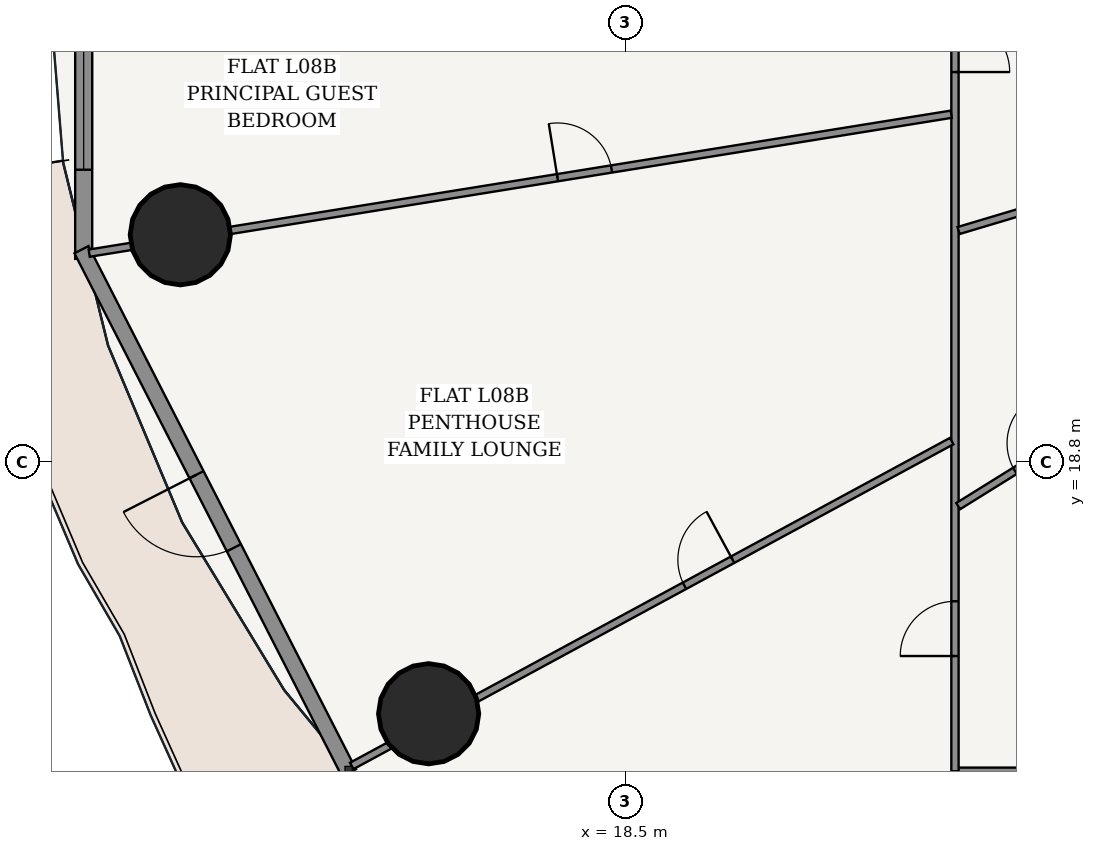
"""IFC4 building model, lengths in metres.
Left out: names, types, materials, properties, quantities, classifications, styles, units other than length and angle.
Written with IfcOpenShell. Run it as: python <this file> out.ifc"""

import sys

from ifc_helpers import new_model, si_unit, direction, frame, frame_2d, origin, origin_2d, place, context, subcontext, project, spatial, rectangle, hollow_circle, extrude, source, transform, mapped, element, fill, save


model = new_model("IFC4")
c1 = context("Model", 3, precision=1e-05, world=origin(), true_north=direction((-0.2419218956, 0.970295726276)))
c2 = subcontext(c1, "Body", "Model", "MODEL_VIEW")
j1 = project(units=[si_unit("LENGTHUNIT", "METRE"), si_unit("PLANEANGLEUNIT", "RADIAN")], contexts=[c1])
p1 = place(None, origin())
s1 = spatial("IfcSite", under=j1, at=p1, CompositionType="ELEMENT")
p2 = place(p1, origin())
s2 = spatial("IfcBuilding", under=s1, at=p2, CompositionType="ELEMENT")
p3 = place(p2, frame((0.0, 0.0, 34.8)))
s3 = spatial("IfcBuildingStorey", under=s2, at=p3, CompositionType="ELEMENT", Elevation=34.8)
for number, where, z_axis, x_axis in (
    (1, (11.176, 22.537, 0.0), (0.0, 0.0, 1.0), (1.0, 0.0, 0.0)),
    (2, (15.259, 14.661, 0.0), (0.0, 0.0, 1.0), (1.0, 0.0, 0.0)),
):
    element("IfcColumn", number, at=place(p3, frame(where, z_axis=z_axis, x_axis=x_axis)), inside=s3, PredefinedType="COLUMN", context=c2, shape_type="SweptSolid", body=[
        extrude(hollow_circle(Radius=0.825, WallThickness=0.05, at=origin_2d()), origin(), (0.0, 0.0, 1.0), 3.6),
    ])
p4 = place(p3, frame((9.587, 31.459, 0.0), z_axis=(0.0, 0.0, 1.0), x_axis=(0.0, -1.0, 0.0)))
e3 = element("IfcWall", 3, at=p4, inside=s3, PredefinedType="SOLIDWALL", context=c2, shape_type="SweptSolid", body=[
    extrude(rectangle(XDim=9.318, YDim=0.28, at=frame_2d((4.659, 0.0))), origin(), (0.0, 0.0, 1.0), 3.32),
])
p5 = place(p4, frame((1.466, 0.0, 0.85)))
e4 = element("IfcOpeningElement", 4, at=p5, cuts=e3, PredefinedType="OPENING", context=c2, shape_type="SweptSolid", body=[
    extrude(rectangle(XDim=2.1, YDim=1.95, at=frame_2d((1.05, 0.975))), frame((0.0, 0.15, 0.0), z_axis=(0.0, -1.0, 0.0), x_axis=(1.0, 0.0, 0.0)), (0.0, 0.0, 1.0), 0.3),
])
p6 = place(p4, frame((5.752, 0.0, 0.85)))
e5 = element("IfcOpeningElement", 5, at=p6, cuts=e3, PredefinedType="OPENING", context=c2, shape_type="SweptSolid", body=[
    extrude(rectangle(XDim=2.1, YDim=1.95, at=frame_2d((1.05, 0.975))), frame((0.0, 0.15, 0.0), z_axis=(0.0, -1.0, 0.0), x_axis=(1.0, 0.0, 0.0)), (0.0, 0.0, 1.0), 0.3),
])
p7 = place(p3, frame((9.55, 22.292, 0.0), z_axis=(0.0, 0.0, 1.0), x_axis=(0.455220575541, -0.890378698984, 0.0)))
e6 = element("IfcWall", 6, at=p7, inside=s3, PredefinedType="SOLIDWALL", context=c2, shape_type="SweptSolid", body=[
    extrude(rectangle(XDim=9.662, YDim=0.26, at=frame_2d((4.831, 0.0))), origin(), (0.0, 0.0, 1.0), 3.32),
])
p8 = place(p7, frame((4.156, 0.0, 0.0)))
e7 = element("IfcOpeningElement", 7, at=p8, cuts=e6, PredefinedType="OPENING", context=c2, shape_type="SweptSolid", body=[
    extrude(rectangle(XDim=1.35, YDim=2.2, at=frame_2d((0.675, 1.1))), frame((0.0, 0.14, 0.0), z_axis=(0.0, -1.0, 0.0), x_axis=(1.0, 0.0, 0.0)), (0.0, 0.0, 1.0), 0.28),
])
p9 = place(p3, frame((27.109, 13.715, 0.0), z_axis=(0.0, 0.0, 1.0), x_axis=(-1.0, 0.0, 0.0)))
e8 = element("IfcWall", 8, at=p9, inside=s3, PredefinedType="PARTITIONING", context=c2, shape_type="SweptSolid", body=[
    extrude(rectangle(XDim=3.194, YDim=0.12, at=frame_2d((1.597, 0.0))), origin(), (0.0, 0.0, 1.0), 2.688),
])
p10 = place(p3, frame((23.915, 13.715, 0.0), z_axis=(0.0, 0.0, 1.0), x_axis=(0.0, 1.0, 0.0)))
e9 = element("IfcWall", 9, at=p10, inside=s3, PredefinedType="PARTITIONING", context=c2, shape_type="SweptSolid", body=[
    extrude(rectangle(XDim=26.17, YDim=0.12, at=frame_2d((13.085, 0.0))), origin(), (0.0, 0.0, 1.0), 2.688),
])
p11 = place(p10, frame((1.895, 0.0, 0.0)))
e10 = element("IfcOpeningElement", 10, at=p11, cuts=e9, PredefinedType="OPENING", context=c2, shape_type="SweptSolid", body=[
    extrude(rectangle(XDim=0.9, YDim=2.15, at=frame_2d((0.45, 1.075))), frame((0.0, 0.07, 0.0), z_axis=(0.0, -1.0, 0.0), x_axis=(1.0, 0.0, 0.0)), (0.0, 0.0, 1.0), 0.14),
])
p12 = place(p10, frame((11.498, 0.0, 0.0)))
e11 = element("IfcOpeningElement", 11, at=p12, cuts=e9, PredefinedType="OPENING", context=c2, shape_type="SweptSolid", body=[
    extrude(rectangle(XDim=0.9, YDim=2.15, at=frame_2d((0.45, 1.075))), frame((0.0, 0.07, 0.0), z_axis=(0.0, -1.0, 0.0), x_axis=(1.0, 0.0, 0.0)), (0.0, 0.0, 1.0), 0.14),
])
p13 = place(p10, frame((23.831, 0.0, 0.0)))
e12 = element("IfcOpeningElement", 12, at=p13, cuts=e9, PredefinedType="OPENING", context=c2, shape_type="SweptSolid", body=[
    extrude(rectangle(XDim=0.86, YDim=2.15, at=frame_2d((0.43, 1.075))), frame((0.0, 0.07, 0.0), z_axis=(0.0, -1.0, 0.0), x_axis=(1.0, 0.0, 0.0)), (0.0, 0.0, 1.0), 0.14),
])
p14 = place(p3, frame((23.854, 24.52, 0.0), z_axis=(0.0, 0.0, 1.0), x_axis=(-0.987258444847, -0.159124991997, 0.0)))
e13 = element("IfcWall", 13, at=p14, inside=s3, PredefinedType="PARTITIONING", context=c2, shape_type="SweptSolid", body=[
    extrude(rectangle(XDim=14.359, YDim=0.12, at=frame_2d((7.18, 0.0))), origin(), (0.0, 0.0, 1.0), 2.688),
])
p15 = place(p14, frame((5.659, 0.0, 0.0)))
e14 = element("IfcOpeningElement", 14, at=p15, cuts=e13, PredefinedType="OPENING", context=c2, shape_type="SweptSolid", body=[
    extrude(rectangle(XDim=0.9, YDim=2.15, at=frame_2d((0.45, 1.075))), frame((0.0, 0.07, 0.0), z_axis=(0.0, -1.0, 0.0), x_axis=(1.0, 0.0, 0.0)), (0.0, 0.0, 1.0), 0.14),
])
p16 = place(p3, frame((23.861, 19.144, 0.0), z_axis=(0.0, 0.0, 1.0), x_axis=(-0.879372452045, -0.476134529922, 0.0)))
e15 = element("IfcWall", 15, at=p16, inside=s3, PredefinedType="PARTITIONING", context=c2, shape_type="SweptSolid", body=[
    extrude(rectangle(XDim=11.219, YDim=0.12, at=frame_2d((5.61, 0.0))), origin(), (0.0, 0.0, 1.0), 2.688),
])
p17 = place(p16, frame((4.097, 0.0, 0.0)))
e16 = element("IfcOpeningElement", 16, at=p17, cuts=e15, PredefinedType="OPENING", context=c2, shape_type="SweptSolid", body=[
    extrude(rectangle(XDim=0.9, YDim=2.15, at=frame_2d((0.45, 1.075))), frame((0.0, 0.07, 0.0), z_axis=(0.0, -1.0, 0.0), x_axis=(1.0, 0.0, 0.0)), (0.0, 0.0, 1.0), 0.14),
])
p18 = place(p3, frame((26.565, 23.382, 0.0), z_axis=(0.0, 0.0, 1.0), x_axis=(-0.958081868855, -0.286494559408, 0.0)))
e17 = element("IfcWall", 17, at=p18, inside=s3, PredefinedType="PARTITIONING", context=c2, shape_type="SweptSolid", body=[
    extrude(rectangle(XDim=2.704, YDim=0.12, at=frame_2d((1.352, 0.0))), origin(), (0.0, 0.0, 1.0), 3.32),
])
p19 = place(p3, frame((26.565, 19.69, 0.0), z_axis=(0.0, 0.0, 1.0), x_axis=(-0.849229217796, -0.52802437031, 0.0)))
e18 = element("IfcWall", 18, at=p19, inside=s3, PredefinedType="PARTITIONING", context=c2, shape_type="SweptSolid", body=[
    extrude(rectangle(XDim=3.059, YDim=0.12, at=frame_2d((1.529, 0.0))), origin(), (0.0, 0.0, 1.0), 3.32),
])
p20 = place(p19, frame((1.099, 0.0, 0.0)))
e19 = element("IfcOpeningElement", 19, at=p20, cuts=e18, PredefinedType="OPENING", context=c2, shape_type="SweptSolid", body=[
    extrude(rectangle(XDim=0.86, YDim=2.15, at=frame_2d((0.43, 1.075))), frame((0.0, 0.07, 0.0), z_axis=(0.0, -1.0, 0.0), x_axis=(1.0, 0.0, 0.0)), (0.0, 0.0, 1.0), 0.14),
])
p21 = place(p3, frame((29.396, 16.365, 0.0), z_axis=(0.0, 0.0, 1.0), x_axis=(-0.636186165667, -0.771535587393, 0.0)))
e20 = element("IfcWall", 20, at=p21, inside=s3, PredefinedType="PARTITIONING", context=c2, shape_type="SweptSolid", body=[
    extrude(rectangle(XDim=11.683, YDim=0.2, at=frame_2d((5.842, 0.0))), origin(), (0.0, 0.0, 1.0), 2.688),
])
m1 = source(origin(), c2, "Body", "SweptSolid", [
    extrude(rectangle(XDim=2.1, YDim=1.95, at=frame_2d((1.05, 0.975))), frame((0.0, 0.03, 0.0), z_axis=(0.0, -1.0, 0.0), x_axis=(1.0, 0.0, 0.0)), (0.0, 0.0, 1.0), 0.06),
])
p22 = place(p6, origin())
e21 = element("IfcWindow", 21, at=p22, inside=s3, PartitioningType="SINGLE_PANEL", PredefinedType="WINDOW", context=c2, shape_type="MappedRepresentation", body=[
    mapped(m1, transform((0.0, 0.0, 0.0), scale=1.0)),
])
fill(e5, e21)
m2 = source(origin(), c2, "Body", "SweptSolid", [
    extrude(rectangle(XDim=1.35, YDim=2.2, at=frame_2d((0.675, 1.1))), frame((0.0, 0.025, 0.0), z_axis=(0.0, -1.0, 0.0), x_axis=(1.0, 0.0, 0.0)), (0.0, 0.0, 1.0), 0.05),
])
p23 = place(p8, frame((1.35, 0.0, 0.0), z_axis=(0.0, 0.0, 1.0), x_axis=(-1.0, 0.0, 0.0)))
e22 = element("IfcDoor", 22, at=p23, inside=s3, OperationType="SINGLE_SWING_RIGHT", PredefinedType="DOOR", context=c2, shape_type="MappedRepresentation", body=[
    mapped(m2, transform((0.0, 0.0, 0.0), scale=1.0)),
])
fill(e7, e22)
m3 = source(origin(), c2, "Body", "SweptSolid", [
    extrude(rectangle(XDim=0.86, YDim=2.15, at=frame_2d((0.43, 1.075))), frame((0.0, 0.025, 0.0), z_axis=(0.0, -1.0, 0.0), x_axis=(1.0, 0.0, 0.0)), (0.0, 0.0, 1.0), 0.05),
])
p24 = place(p20, frame((0.86, 0.0, 0.0), z_axis=(0.0, 0.0, 1.0), x_axis=(-1.0, 0.0, 0.0)))
e23 = element("IfcDoor", 23, at=p24, inside=s3, OperationType="SINGLE_SWING_RIGHT", PredefinedType="DOOR", context=c2, shape_type="MappedRepresentation", body=[
    mapped(m3, transform((0.0, 0.0, 0.0), scale=1.0)),
])
fill(e19, e23)
m4 = source(origin(), c2, "Body", "SweptSolid", [
    extrude(rectangle(XDim=0.9, YDim=2.15, at=frame_2d((0.45, 1.075))), frame((0.0, 0.025, 0.0), z_axis=(0.0, -1.0, 0.0), x_axis=(1.0, 0.0, 0.0)), (0.0, 0.0, 1.0), 0.05),
])
p25 = place(p11, origin())
e24 = element("IfcDoor", 24, at=p25, inside=s3, OperationType="SINGLE_SWING_LEFT", PredefinedType="DOOR", context=c2, shape_type="MappedRepresentation", body=[
    mapped(m4, transform((0.0, 0.0, 0.0), scale=1.0)),
])
fill(e10, e24)
p26 = place(p17, frame((0.9, 0.0, 0.0), z_axis=(0.0, 0.0, 1.0), x_axis=(-1.0, 0.0, 0.0)))
e25 = element("IfcDoor", 25, at=p26, inside=s3, OperationType="SINGLE_SWING_RIGHT", PredefinedType="DOOR", context=c2, shape_type="MappedRepresentation", body=[
    mapped(m4, transform((0.0, 0.0, 0.0), scale=1.0)),
])
fill(e16, e25)
p27 = place(p15, frame((0.9, 0.0, 0.0), z_axis=(0.0, 0.0, 1.0), x_axis=(-1.0, 0.0, 0.0)))
e26 = element("IfcDoor", 26, at=p27, inside=s3, OperationType="SINGLE_SWING_LEFT", PredefinedType="DOOR", context=c2, shape_type="MappedRepresentation", body=[
    mapped(m4, transform((0.0, 0.0, 0.0), scale=1.0)),
])
fill(e14, e26)
p28 = place(p12, frame((0.9, 0.0, 0.0), z_axis=(0.0, 0.0, 1.0), x_axis=(-1.0, 0.0, 0.0)))
e27 = element("IfcDoor", 27, at=p28, inside=s3, OperationType="SINGLE_SWING_RIGHT", PredefinedType="DOOR", context=c2, shape_type="MappedRepresentation", body=[
    mapped(m4, transform((0.0, 0.0, 0.0), scale=1.0)),
])
fill(e11, e27)
save(model, sys.argv[1])
